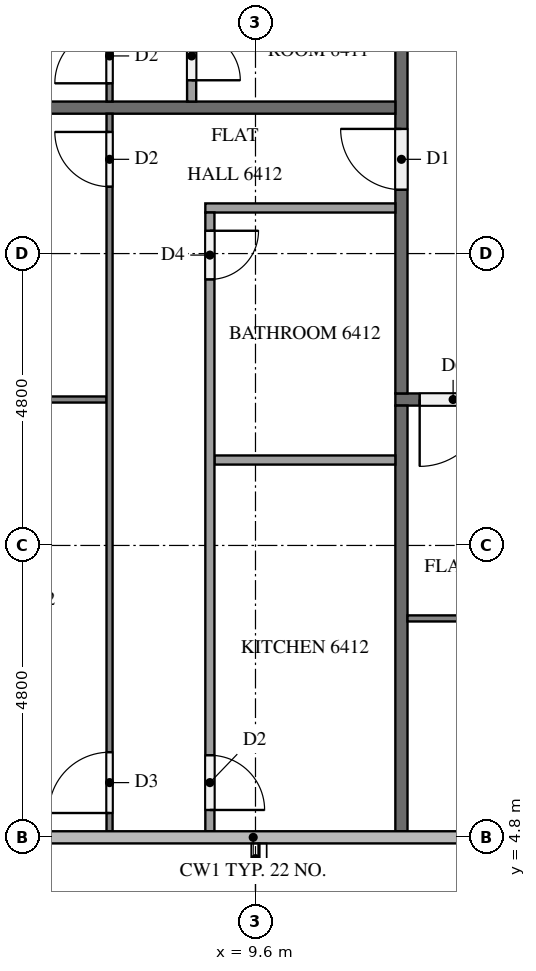
"""IFC4 building model, lengths in metres.
Left out: names, types, materials, properties, quantities, classifications, styles, units other than length and angle.
Written with IfcOpenShell. Run it as: python <this file> out.ifc"""

import sys

from ifc_helpers import new_model, si_unit, direction, frame, frame_2d, origin, place, context, subcontext, project, spatial, rectangle, extrude, element, fill, save


model = new_model("IFC4")
c1 = context("Model", 3, precision=1e-05, world=origin(), true_north=direction((0.0, 1.0)))
c2 = subcontext(c1, "Body", "Model", "MODEL_VIEW")
j1 = project(units=[si_unit("LENGTHUNIT", "METRE"), si_unit("PLANEANGLEUNIT", "RADIAN")], contexts=[c1])
p1 = place(None, origin())
s1 = spatial("IfcSite", under=j1, at=p1, CompositionType="ELEMENT")
p2 = place(p1, origin())
s2 = spatial("IfcBuilding", under=s1, at=p2, CompositionType="ELEMENT")
p3 = place(p2, frame((0.0, 0.0, 245.7)))
s3 = spatial("IfcBuildingStorey", under=s2, at=p3, CompositionType="ELEMENT", Elevation=245.7)
p4 = place(p3, frame((50.5, 12.0, 0.0), z_axis=(0.0, 0.0, 1.0), x_axis=(-1.0, 0.0, 0.0)))
e1 = element("IfcWall", 1, at=p4, inside=s3, PredefinedType="PARTITIONING", context=c2, shape_type="SweptSolid", body=[
    extrude(rectangle(XDim=38.6, YDim=0.2, at=frame_2d((19.3, 0.0))), origin(), (0.0, 0.0, 1.0), 3.2),
])
p5 = place(p4, frame((37.1, 0.0, 0.0)))
e2 = element("IfcOpeningElement", 2, at=p5, cuts=e1, PredefinedType="OPENING", context=c2, shape_type="SweptSolid", body=[
    extrude(rectangle(XDim=1.1, YDim=2.1, at=frame_2d((0.55, 1.05))), frame((0.0, 0.11, 0.0), z_axis=(0.0, -1.0, 0.0), x_axis=(1.0, 0.0, 0.0)), (0.0, 0.0, 1.0), 0.22),
])
p6 = place(p4, frame((17.95, 0.0, 0.0)))
e3 = element("IfcOpeningElement", 3, at=p6, cuts=e1, PredefinedType="OPENING", context=c2, shape_type="SweptSolid", body=[
    extrude(rectangle(XDim=1.0, YDim=2.1, at=frame_2d((0.5, 1.05))), frame((0.0, 0.11, 0.0), z_axis=(0.0, -1.0, 0.0), x_axis=(1.0, 0.0, 0.0)), (0.0, 0.0, 1.0), 0.22),
])
p7 = place(p4, frame((8.35, 0.0, 0.0)))
e4 = element("IfcOpeningElement", 4, at=p7, cuts=e1, PredefinedType="OPENING", context=c2, shape_type="SweptSolid", body=[
    extrude(rectangle(XDim=1.0, YDim=2.1, at=frame_2d((0.5, 1.05))), frame((0.0, 0.11, 0.0), z_axis=(0.0, -1.0, 0.0), x_axis=(1.0, 0.0, 0.0)), (0.0, 0.0, 1.0), 0.22),
])
p8 = place(p3, frame((12.0, 12.1, 0.0), z_axis=(0.0, 0.0, 1.0), x_axis=(0.0, 1.0, 0.0)))
e5 = element("IfcWall", 5, at=p8, inside=s3, PredefinedType="PARTITIONING", context=c2, shape_type="SweptSolid", body=[
    extrude(rectangle(XDim=28.6, YDim=0.2, at=frame_2d((14.3, 0.0))), origin(), (0.0, 0.0, 1.0), 3.2),
])
p9 = place(p8, frame((27.35, 0.0, 0.0)))
e6 = element("IfcOpeningElement", 6, at=p9, cuts=e5, PredefinedType="OPENING", context=c2, shape_type="SweptSolid", body=[
    extrude(rectangle(XDim=1.0, YDim=2.1, at=frame_2d((0.5, 1.05))), frame((0.0, 0.11, 0.0), z_axis=(0.0, -1.0, 0.0), x_axis=(1.0, 0.0, 0.0)), (0.0, 0.0, 1.0), 0.22),
])
p10 = place(p8, frame((17.75, 0.0, 0.0)))
e7 = element("IfcOpeningElement", 7, at=p10, cuts=e5, PredefinedType="OPENING", context=c2, shape_type="SweptSolid", body=[
    extrude(rectangle(XDim=1.0, YDim=2.1, at=frame_2d((0.5, 1.05))), frame((0.0, 0.11, 0.0), z_axis=(0.0, -1.0, 0.0), x_axis=(1.0, 0.0, 0.0)), (0.0, 0.0, 1.0), 0.22),
])
p11 = place(p8, frame((3.35, 0.0, 0.0)))
e8 = element("IfcOpeningElement", 8, at=p11, cuts=e5, PredefinedType="OPENING", context=c2, shape_type="SweptSolid", body=[
    extrude(rectangle(XDim=1.0, YDim=2.1, at=frame_2d((0.5, 1.05))), frame((0.0, 0.11, 0.0), z_axis=(0.0, -1.0, 0.0), x_axis=(1.0, 0.0, 0.0)), (0.0, 0.0, 1.0), 0.22),
])
p12 = place(p3, frame((12.0, 4.9, 0.0), z_axis=(0.0, 0.0, 1.0), x_axis=(0.0, 1.0, 0.0)))
e9 = element("IfcWall", 9, at=p12, inside=s3, PredefinedType="PARTITIONING", context=c2, shape_type="SweptSolid", body=[
    extrude(rectangle(XDim=7.0, YDim=0.2, at=frame_2d((3.5, 0.0))), origin(), (0.0, 0.0, 1.0), 3.2),
])
p13 = place(p3, frame((0.1, 16.8, 0.0), z_axis=(0.0, 0.0, 1.0), x_axis=(1.0, 0.0, 0.0)))
e10 = element("IfcWall", 10, at=p13, inside=s3, PredefinedType="PARTITIONING", context=c2, shape_type="SweptSolid", body=[
    extrude(rectangle(XDim=11.8, YDim=0.2, at=frame_2d((5.9, 0.0))), origin(), (0.0, 0.0, 1.0), 3.2),
])
p14 = place(p3, frame((31.1, 8.4, 0.0), z_axis=(0.0, 0.0, 1.0), x_axis=(-1.0, 0.0, 0.0)))
e11 = element("IfcWall", 11, at=p14, inside=s3, PredefinedType="PARTITIONING", context=c2, shape_type="SweptSolid", body=[
    extrude(rectangle(XDim=19.0, YDim=0.1, at=frame_2d((9.5, 0.0))), origin(), (0.0, 0.0, 1.0), 3.2),
])
p15 = place(p14, frame((14.65, 0.0, 0.0)))
e12 = element("IfcOpeningElement", 12, at=p15, cuts=e11, PredefinedType="OPENING", context=c2, shape_type="SweptSolid", body=[
    extrude(rectangle(XDim=0.9, YDim=2.1, at=frame_2d((0.45, 1.05))), frame((0.0, 0.06, 0.0), z_axis=(0.0, -1.0, 0.0), x_axis=(1.0, 0.0, 0.0)), (0.0, 0.0, 1.0), 0.12),
])
p16 = place(p14, frame((12.95, 0.0, 0.0)))
e13 = element("IfcOpeningElement", 13, at=p16, cuts=e11, PredefinedType="OPENING", context=c2, shape_type="SweptSolid", body=[
    extrude(rectangle(XDim=1.0, YDim=2.1, at=frame_2d((0.5, 1.05))), frame((0.0, 0.06, 0.0), z_axis=(0.0, -1.0, 0.0), x_axis=(1.0, 0.0, 0.0)), (0.0, 0.0, 1.0), 0.12),
])
p17 = place(p14, frame((5.05, 0.0, 0.0)))
e14 = element("IfcOpeningElement", 14, at=p17, cuts=e11, PredefinedType="OPENING", context=c2, shape_type="SweptSolid", body=[
    extrude(rectangle(XDim=0.9, YDim=2.1, at=frame_2d((0.45, 1.05))), frame((0.0, 0.06, 0.0), z_axis=(0.0, -1.0, 0.0), x_axis=(1.0, 0.0, 0.0)), (0.0, 0.0, 1.0), 0.12),
])
p18 = place(p14, frame((3.45, 0.0, 0.0)))
e15 = element("IfcOpeningElement", 15, at=p18, cuts=e11, PredefinedType="OPENING", context=c2, shape_type="SweptSolid", body=[
    extrude(rectangle(XDim=0.9, YDim=2.1, at=frame_2d((0.45, 1.05))), frame((0.0, 0.06, 0.0), z_axis=(0.0, -1.0, 0.0), x_axis=(1.0, 0.0, 0.0)), (0.0, 0.0, 1.0), 0.12),
])
p19 = place(p3, frame((7.2, 16.9, 0.0), z_axis=(0.0, 0.0, 1.0), x_axis=(0.0, 1.0, 0.0)))
e16 = element("IfcWall", 16, at=p19, inside=s3, PredefinedType="PARTITIONING", context=c2, shape_type="SweptSolid", body=[
    extrude(rectangle(XDim=14.2, YDim=0.1, at=frame_2d((7.1, 0.0))), origin(), (0.0, 0.0, 1.0), 3.2),
])
p20 = place(p19, frame((9.85, 0.0, 0.0)))
e17 = element("IfcOpeningElement", 17, at=p20, cuts=e16, PredefinedType="OPENING", context=c2, shape_type="SweptSolid", body=[
    extrude(rectangle(XDim=1.0, YDim=2.1, at=frame_2d((0.5, 1.05))), frame((0.0, 0.06, 0.0), z_axis=(0.0, -1.0, 0.0), x_axis=(1.0, 0.0, 0.0)), (0.0, 0.0, 1.0), 0.12),
])
p21 = place(p19, frame((8.25, 0.0, 0.0)))
e18 = element("IfcOpeningElement", 18, at=p21, cuts=e16, PredefinedType="OPENING", context=c2, shape_type="SweptSolid", body=[
    extrude(rectangle(XDim=0.9, YDim=2.1, at=frame_2d((0.45, 1.05))), frame((0.0, 0.06, 0.0), z_axis=(0.0, -1.0, 0.0), x_axis=(1.0, 0.0, 0.0)), (0.0, 0.0, 1.0), 0.12),
])
p22 = place(p19, frame((0.3, 0.0, 0.0)))
e19 = element("IfcOpeningElement", 19, at=p22, cuts=e16, PredefinedType="OPENING", context=c2, shape_type="SweptSolid", body=[
    extrude(rectangle(XDim=0.9, YDim=2.1, at=frame_2d((0.45, 1.05))), frame((0.0, 0.06, 0.0), z_axis=(0.0, -1.0, 0.0), x_axis=(1.0, 0.0, 0.0)), (0.0, 0.0, 1.0), 0.12),
])
p23 = place(p3, frame((8.55, 29.475, 0.0), z_axis=(0.0, 0.0, 1.0), x_axis=(0.0, -1.0, 0.0)))
e20 = element("IfcWall", 20, at=p23, inside=s3, PredefinedType="PARTITIONING", context=c2, shape_type="SweptSolid", body=[
    extrude(rectangle(XDim=12.575, YDim=0.15, at=frame_2d((6.288, 0.0))), origin(), (0.0, 0.0, 1.0), 3.2),
])
p24 = place(p23, frame((4.579, 0.0, 0.0)))
e21 = element("IfcOpeningElement", 21, at=p24, cuts=e20, PredefinedType="OPENING", context=c2, shape_type="SweptSolid", body=[
    extrude(rectangle(XDim=0.9, YDim=2.1, at=frame_2d((0.45, 1.05))), frame((0.0, 0.085, 0.0), z_axis=(0.0, -1.0, 0.0), x_axis=(1.0, 0.0, 0.0)), (0.0, 0.0, 1.0), 0.17),
])
p25 = place(p23, frame((6.129, 0.0, 0.0)))
e22 = element("IfcOpeningElement", 22, at=p25, cuts=e20, PredefinedType="OPENING", context=c2, shape_type="SweptSolid", body=[
    extrude(rectangle(XDim=0.9, YDim=2.1, at=frame_2d((0.45, 1.05))), frame((0.0, 0.085, 0.0), z_axis=(0.0, -1.0, 0.0), x_axis=(1.0, 0.0, 0.0)), (0.0, 0.0, 1.0), 0.17),
])
p26 = place(p23, frame((11.425, 0.0, 0.0)))
e23 = element("IfcOpeningElement", 23, at=p26, cuts=e20, PredefinedType="OPENING", context=c2, shape_type="SweptSolid", body=[
    extrude(rectangle(XDim=0.8, YDim=2.1, at=frame_2d((0.4, 1.05))), frame((0.0, 0.085, 0.0), z_axis=(0.0, -1.0, 0.0), x_axis=(1.0, 0.0, 0.0)), (0.0, 0.0, 1.0), 0.17),
])
p27 = place(p3, frame((7.15, 12.0, 0.0), z_axis=(0.0, 0.0, 1.0), x_axis=(-1.0, 0.0, 0.0)))
e24 = element("IfcWall", 24, at=p27, inside=s3, PredefinedType="PARTITIONING", context=c2, shape_type="SweptSolid", body=[
    extrude(rectangle(XDim=7.05, YDim=0.1, at=frame_2d((3.525, 0.0))), origin(), (0.0, 0.0, 1.0), 3.2),
])
p28 = place(p3, frame((7.2, 4.9, 0.0), z_axis=(0.0, 0.0, 1.0), x_axis=(0.0, 1.0, 0.0)))
e25 = element("IfcWall", 25, at=p28, inside=s3, PredefinedType="PARTITIONING", context=c2, shape_type="SweptSolid", body=[
    extrude(rectangle(XDim=11.8, YDim=0.1, at=frame_2d((5.9, 0.0))), origin(), (0.0, 0.0, 1.0), 3.2),
])
p29 = place(p28, frame((10.6, 0.0, 0.0)))
e26 = element("IfcOpeningElement", 26, at=p29, cuts=e25, PredefinedType="OPENING", context=c2, shape_type="SweptSolid", body=[
    extrude(rectangle(XDim=0.9, YDim=2.1, at=frame_2d((0.45, 1.05))), frame((0.0, 0.06, 0.0), z_axis=(0.0, -1.0, 0.0), x_axis=(1.0, 0.0, 0.0)), (0.0, 0.0, 1.0), 0.12),
])
p30 = place(p28, frame((0.3, 0.0, 0.0)))
e27 = element("IfcOpeningElement", 27, at=p30, cuts=e25, PredefinedType="OPENING", context=c2, shape_type="SweptSolid", body=[
    extrude(rectangle(XDim=1.0, YDim=2.1, at=frame_2d((0.5, 1.05))), frame((0.0, 0.06, 0.0), z_axis=(0.0, -1.0, 0.0), x_axis=(1.0, 0.0, 0.0)), (0.0, 0.0, 1.0), 0.12),
])
p31 = place(p3, frame((11.9, 11.005, 0.0), z_axis=(0.0, 0.0, 1.0), x_axis=(-1.0, 0.0, 0.0)))
e28 = element("IfcWall", 28, at=p31, inside=s3, PredefinedType="PARTITIONING", context=c2, shape_type="SweptSolid", body=[
    extrude(rectangle(XDim=2.975, YDim=0.15, at=frame_2d((1.487, 0.0))), origin(), (0.0, 0.0, 1.0), 3.2),
])
p32 = place(p3, frame((11.9, 15.15, 0.0), z_axis=(0.0, 0.0, 1.0), x_axis=(-1.0, 0.0, 0.0)))
e29 = element("IfcWall", 29, at=p32, inside=s3, PredefinedType="PARTITIONING", context=c2, shape_type="SweptSolid", body=[
    extrude(rectangle(XDim=3.125, YDim=0.15, at=frame_2d((1.562, 0.0))), origin(), (0.0, 0.0, 1.0), 3.2),
])
p33 = place(p3, frame((8.85, 15.075, 0.0), z_axis=(0.0, 0.0, 1.0), x_axis=(0.0, -1.0, 0.0)))
e30 = element("IfcWall", 30, at=p33, inside=s3, PredefinedType="PARTITIONING", context=c2, shape_type="SweptSolid", body=[
    extrude(rectangle(XDim=10.175, YDim=0.15, at=frame_2d((5.087, 0.0))), origin(), (0.0, 0.0, 1.0), 3.2),
])
p34 = place(p33, frame((0.3, 0.0, 0.0)))
e31 = element("IfcOpeningElement", 31, at=p34, cuts=e30, PredefinedType="OPENING", context=c2, shape_type="SweptSolid", body=[
    extrude(rectangle(XDim=0.8, YDim=2.1, at=frame_2d((0.4, 1.05))), frame((0.0, 0.085, 0.0), z_axis=(0.0, -1.0, 0.0), x_axis=(1.0, 0.0, 0.0)), (0.0, 0.0, 1.0), 0.17),
])
p35 = place(p33, frame((8.925, 0.0, 0.0)))
e32 = element("IfcOpeningElement", 32, at=p35, cuts=e30, PredefinedType="OPENING", context=c2, shape_type="SweptSolid", body=[
    extrude(rectangle(XDim=0.9, YDim=2.1, at=frame_2d((0.45, 1.05))), frame((0.0, 0.085, 0.0), z_axis=(0.0, -1.0, 0.0), x_axis=(1.0, 0.0, 0.0)), (0.0, 0.0, 1.0), 0.17),
])
p36 = place(p5, origin())
e33 = element("IfcDoor", 33, at=p36, inside=s3, OperationType="SINGLE_SWING_RIGHT", PredefinedType="DOOR", context=c2, shape_type="SweptSolid", body=[
    extrude(rectangle(XDim=1.1, YDim=2.1, at=frame_2d((0.55, 1.05))), frame((0.0, 0.025, 0.0), z_axis=(0.0, -1.0, 0.0), x_axis=(1.0, 0.0, 0.0)), (0.0, 0.0, 1.0), 0.05),
])
fill(e2, e33)
p37 = place(p11, origin())
e34 = element("IfcDoor", 34, at=p37, inside=s3, OperationType="SINGLE_SWING_RIGHT", PredefinedType="DOOR", context=c2, shape_type="SweptSolid", body=[
    extrude(rectangle(XDim=1.0, YDim=2.1, at=frame_2d((0.5, 1.05))), frame((0.0, 0.025, 0.0), z_axis=(0.0, -1.0, 0.0), x_axis=(1.0, 0.0, 0.0)), (0.0, 0.0, 1.0), 0.05),
])
fill(e8, e34)
p38 = place(p22, origin())
e35 = element("IfcDoor", 35, at=p38, inside=s3, OperationType="SINGLE_SWING_LEFT", PredefinedType="DOOR", context=c2, shape_type="SweptSolid", body=[
    extrude(rectangle(XDim=0.9, YDim=2.1, at=frame_2d((0.45, 1.05))), frame((0.0, 0.025, 0.0), z_axis=(0.0, -1.0, 0.0), x_axis=(1.0, 0.0, 0.0)), (0.0, 0.0, 1.0), 0.05),
])
fill(e19, e35)
p39 = place(p26, origin())
e36 = element("IfcDoor", 36, at=p39, inside=s3, OperationType="SINGLE_SWING_RIGHT", PredefinedType="DOOR", context=c2, shape_type="SweptSolid", body=[
    extrude(rectangle(XDim=0.8, YDim=2.1, at=frame_2d((0.4, 1.05))), frame((0.0, 0.025, 0.0), z_axis=(0.0, -1.0, 0.0), x_axis=(1.0, 0.0, 0.0)), (0.0, 0.0, 1.0), 0.05),
])
fill(e23, e36)
p40 = place(p29, origin())
e37 = element("IfcDoor", 37, at=p40, inside=s3, OperationType="SINGLE_SWING_RIGHT", PredefinedType="DOOR", context=c2, shape_type="SweptSolid", body=[
    extrude(rectangle(XDim=0.9, YDim=2.1, at=frame_2d((0.45, 1.05))), frame((0.0, 0.025, 0.0), z_axis=(0.0, -1.0, 0.0), x_axis=(1.0, 0.0, 0.0)), (0.0, 0.0, 1.0), 0.05),
])
fill(e26, e37)
p41 = place(p30, origin())
e38 = element("IfcDoor", 38, at=p41, inside=s3, OperationType="SINGLE_SWING_LEFT", PredefinedType="DOOR", context=c2, shape_type="SweptSolid", body=[
    extrude(rectangle(XDim=1.0, YDim=2.1, at=frame_2d((0.5, 1.05))), frame((0.0, 0.025, 0.0), z_axis=(0.0, -1.0, 0.0), x_axis=(1.0, 0.0, 0.0)), (0.0, 0.0, 1.0), 0.05),
])
fill(e27, e38)
p42 = place(p34, origin())
e39 = element("IfcDoor", 39, at=p42, inside=s3, OperationType="SINGLE_SWING_LEFT", PredefinedType="DOOR", context=c2, shape_type="SweptSolid", body=[
    extrude(rectangle(XDim=0.8, YDim=2.1, at=frame_2d((0.4, 1.05))), frame((0.0, 0.025, 0.0), z_axis=(0.0, -1.0, 0.0), x_axis=(1.0, 0.0, 0.0)), (0.0, 0.0, 1.0), 0.05),
])
fill(e31, e39)
p43 = place(p35, origin())
e40 = element("IfcDoor", 40, at=p43, inside=s3, OperationType="SINGLE_SWING_RIGHT", PredefinedType="DOOR", context=c2, shape_type="SweptSolid", body=[
    extrude(rectangle(XDim=0.9, YDim=2.1, at=frame_2d((0.45, 1.05))), frame((0.0, 0.025, 0.0), z_axis=(0.0, -1.0, 0.0), x_axis=(1.0, 0.0, 0.0)), (0.0, 0.0, 1.0), 0.05),
])
fill(e32, e40)
save(model, sys.argv[1])
